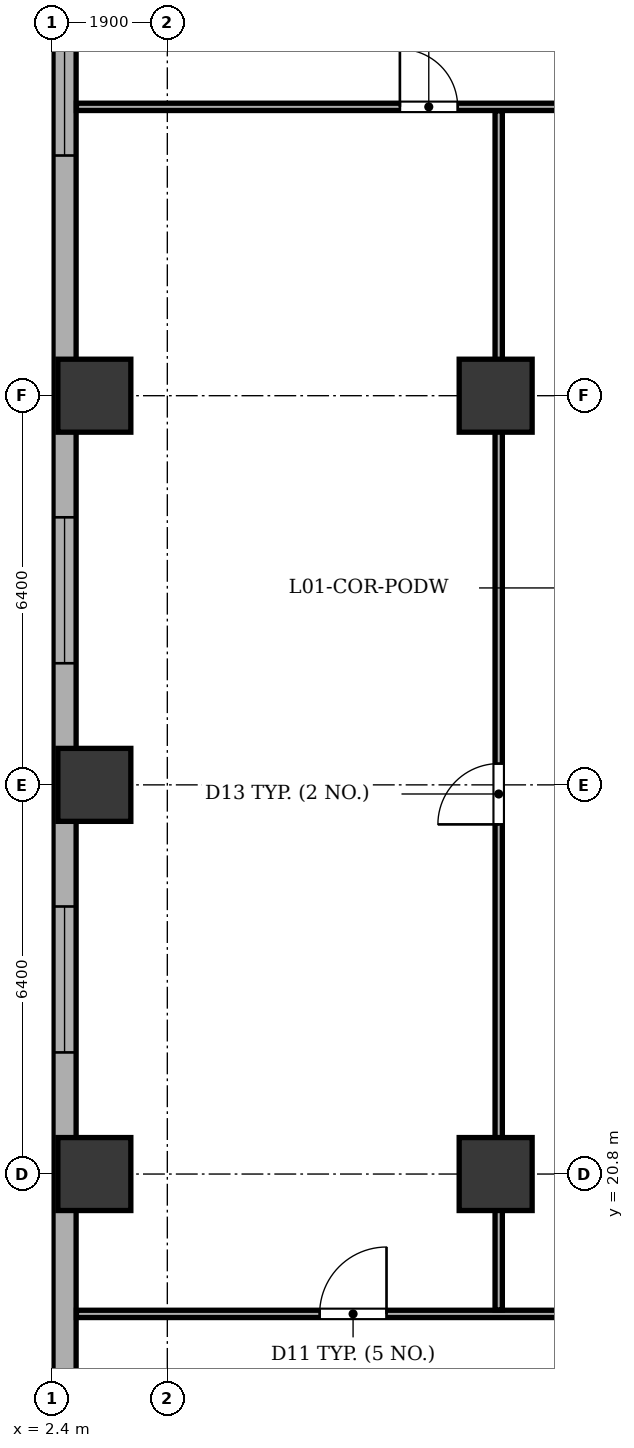
"""IFC4 building model, lengths in metres.
Left out: names, types, materials, properties, quantities, classifications, styles, units other than length and angle.
Written with IfcOpenShell. Run it as: python <this file> out.ifc"""

import sys

from ifc_helpers import new_model, si_unit, direction, frame, frame_2d, origin, origin_2d, place, context, subcontext, project, spatial, rectangle, extrude, element, fill, save


model = new_model("IFC4")
c1 = context("Model", 3, precision=1e-05, world=origin(), true_north=direction((0.0, 1.0)))
c2 = subcontext(c1, "Body", "Model", "MODEL_VIEW")
j1 = project(units=[si_unit("LENGTHUNIT", "METRE"), si_unit("PLANEANGLEUNIT", "RADIAN")], contexts=[c1])
p1 = place(None, origin())
s1 = spatial("IfcSite", under=j1, at=p1, CompositionType="ELEMENT")
p2 = place(p1, origin())
s2 = spatial("IfcBuilding", under=s1, at=p2, CompositionType="ELEMENT")
p3 = place(p2, frame((0.0, 0.0, 5.4)))
s3 = spatial("IfcBuildingStorey", under=s2, at=p3, CompositionType="ELEMENT", Elevation=5.4)
for number, where, z_axis, x_axis in (
    (1, (3.1, 20.8, 0.0), (0.0, 0.0, 1.0), (1.0, 0.0, 0.0)),
    (2, (3.1, 27.2, 0.0), (0.0, 0.0, 1.0), (1.0, 0.0, 0.0)),
    (3, (3.1, 33.6, 0.0), (0.0, 0.0, 1.0), (1.0, 0.0, 0.0)),
    (4, (9.7, 20.8, 0.0), (0.0, 0.0, 1.0), (1.0, 0.0, 0.0)),
    (5, (9.7, 33.6, 0.0), (0.0, 0.0, 1.0), (1.0, 0.0, 0.0)),
):
    element("IfcColumn", number, at=place(p3, frame(where, z_axis=z_axis, x_axis=x_axis)), inside=s3, PredefinedType="COLUMN", context=c2, shape_type="SweptSolid", body=[
        extrude(rectangle(XDim=1.2, YDim=1.2, at=origin_2d()), origin(), (0.0, 0.0, 1.0), 4.5),
    ])
p4 = place(p3, frame((2.61, 4.5, 0.0), z_axis=(0.0, 0.0, 1.0), x_axis=(0.0, 1.0, 0.0)))
e6 = element("IfcWall", 6, at=p4, inside=s3, PredefinedType="STANDARD", context=c2, shape_type="SweptSolid", body=[
    extrude(rectangle(XDim=45.4, YDim=0.38, at=frame_2d((22.7, 0.0))), origin(), (0.0, 0.0, 1.0), 4.18),
])
p5 = place(p4, frame((1.275, 0.0, 0.75)))
e7 = element("IfcOpeningElement", 7, at=p5, cuts=e6, PredefinedType="OPENING", context=c2, shape_type="SweptSolid", body=[
    extrude(rectangle(XDim=2.4, YDim=2.1, at=frame_2d((1.2, 1.05))), frame((0.0, 0.2, 0.0), z_axis=(0.0, -1.0, 0.0), x_axis=(1.0, 0.0, 0.0)), (0.0, 0.0, 1.0), 0.4),
])
p6 = place(p4, frame((9.95, 0.0, 0.75)))
e8 = element("IfcOpeningElement", 8, at=p6, cuts=e6, PredefinedType="OPENING", context=c2, shape_type="SweptSolid", body=[
    extrude(rectangle(XDim=2.4, YDim=2.1, at=frame_2d((1.2, 1.05))), frame((0.0, 0.2, 0.0), z_axis=(0.0, -1.0, 0.0), x_axis=(1.0, 0.0, 0.0)), (0.0, 0.0, 1.0), 0.4),
])
p7 = place(p4, frame((18.3, 0.0, 0.75)))
e9 = element("IfcOpeningElement", 9, at=p7, cuts=e6, PredefinedType="OPENING", context=c2, shape_type="SweptSolid", body=[
    extrude(rectangle(XDim=2.4, YDim=2.1, at=frame_2d((1.2, 1.05))), frame((0.0, 0.2, 0.0), z_axis=(0.0, -1.0, 0.0), x_axis=(1.0, 0.0, 0.0)), (0.0, 0.0, 1.0), 0.4),
])
p8 = place(p4, frame((24.7, 0.0, 0.75)))
e10 = element("IfcOpeningElement", 10, at=p8, cuts=e6, PredefinedType="OPENING", context=c2, shape_type="SweptSolid", body=[
    extrude(rectangle(XDim=2.4, YDim=2.1, at=frame_2d((1.2, 1.05))), frame((0.0, 0.2, 0.0), z_axis=(0.0, -1.0, 0.0), x_axis=(1.0, 0.0, 0.0)), (0.0, 0.0, 1.0), 0.4),
])
p9 = place(p4, frame((33.05, 0.0, 0.75)))
e11 = element("IfcOpeningElement", 11, at=p9, cuts=e6, PredefinedType="OPENING", context=c2, shape_type="SweptSolid", body=[
    extrude(rectangle(XDim=2.4, YDim=2.1, at=frame_2d((1.2, 1.05))), frame((0.0, 0.2, 0.0), z_axis=(0.0, -1.0, 0.0), x_axis=(1.0, 0.0, 0.0)), (0.0, 0.0, 1.0), 0.4),
])
p10 = place(p4, frame((41.725, 0.0, 0.75)))
e12 = element("IfcOpeningElement", 12, at=p10, cuts=e6, PredefinedType="OPENING", context=c2, shape_type="SweptSolid", body=[
    extrude(rectangle(XDim=2.4, YDim=2.1, at=frame_2d((1.2, 1.05))), frame((0.0, 0.2, 0.0), z_axis=(0.0, -1.0, 0.0), x_axis=(1.0, 0.0, 0.0)), (0.0, 0.0, 1.0), 0.4),
])
p11 = place(p3, frame((2.805, 18.5, 0.0), z_axis=(0.0, 0.0, 1.0), x_axis=(1.0, 0.0, 0.0)))
e13 = element("IfcWall", 13, at=p11, inside=s3, PredefinedType="PARTITIONING", context=c2, shape_type="SweptSolid", body=[
    extrude(rectangle(XDim=19.18, YDim=0.12, at=frame_2d((9.59, 0.0))), origin(), (0.0, 0.0, 1.0), 3.665),
])
p12 = place(p11, frame((4.0, 0.0, 0.0)))
e14 = element("IfcOpeningElement", 14, at=p12, cuts=e13, PredefinedType="OPENING", context=c2, shape_type="SweptSolid", body=[
    extrude(rectangle(XDim=1.1, YDim=2.15, at=frame_2d((0.55, 1.075))), frame((0.0, 0.07, 0.0), z_axis=(0.0, -1.0, 0.0), x_axis=(1.0, 0.0, 0.0)), (0.0, 0.0, 1.0), 0.14),
])
p13 = place(p11, frame((12.3, 0.0, 0.0)))
e15 = element("IfcOpeningElement", 15, at=p13, cuts=e13, PredefinedType="OPENING", context=c2, shape_type="SweptSolid", body=[
    extrude(rectangle(XDim=1.1, YDim=2.15, at=frame_2d((0.55, 1.075))), frame((0.0, 0.07, 0.0), z_axis=(0.0, -1.0, 0.0), x_axis=(1.0, 0.0, 0.0)), (0.0, 0.0, 1.0), 0.14),
])
p14 = place(p3, frame((2.805, 38.35, 0.0), z_axis=(0.0, 0.0, 1.0), x_axis=(1.0, 0.0, 0.0)))
e16 = element("IfcWall", 16, at=p14, inside=s3, PredefinedType="PARTITIONING", context=c2, shape_type="SweptSolid", body=[
    extrude(rectangle(XDim=54.79, YDim=0.12, at=frame_2d((27.395, 0.0))), origin(), (0.0, 0.0, 1.0), 4.18),
])
p15 = place(p14, frame((5.32, 0.0, 0.0)))
e17 = element("IfcOpeningElement", 17, at=p15, cuts=e16, PredefinedType="OPENING", context=c2, shape_type="SweptSolid", body=[
    extrude(rectangle(XDim=0.95, YDim=2.1, at=frame_2d((0.475, 1.05))), frame((0.0, 0.07, 0.0), z_axis=(0.0, -1.0, 0.0), x_axis=(1.0, 0.0, 0.0)), (0.0, 0.0, 1.0), 0.14),
])
p16 = place(p14, frame((13.87, 0.0, 0.0)))
e18 = element("IfcOpeningElement", 18, at=p16, cuts=e16, PredefinedType="OPENING", context=c2, shape_type="SweptSolid", body=[
    extrude(rectangle(XDim=0.95, YDim=2.1, at=frame_2d((0.475, 1.05))), frame((0.0, 0.07, 0.0), z_axis=(0.0, -1.0, 0.0), x_axis=(1.0, 0.0, 0.0)), (0.0, 0.0, 1.0), 0.14),
])
p17 = place(p14, frame((19.12, 0.0, 0.0)))
e19 = element("IfcOpeningElement", 19, at=p17, cuts=e16, PredefinedType="OPENING", context=c2, shape_type="SweptSolid", body=[
    extrude(rectangle(XDim=0.95, YDim=2.1, at=frame_2d((0.475, 1.05))), frame((0.0, 0.07, 0.0), z_axis=(0.0, -1.0, 0.0), x_axis=(1.0, 0.0, 0.0)), (0.0, 0.0, 1.0), 0.14),
])
p18 = place(p14, frame((23.87, 0.0, 0.0)))
e20 = element("IfcOpeningElement", 20, at=p18, cuts=e16, PredefinedType="OPENING", context=c2, shape_type="SweptSolid", body=[
    extrude(rectangle(XDim=0.95, YDim=2.1, at=frame_2d((0.475, 1.05))), frame((0.0, 0.07, 0.0), z_axis=(0.0, -1.0, 0.0), x_axis=(1.0, 0.0, 0.0)), (0.0, 0.0, 1.0), 0.14),
])
p19 = place(p14, frame((32.87, 0.0, 0.0)))
e21 = element("IfcOpeningElement", 21, at=p19, cuts=e16, PredefinedType="OPENING", context=c2, shape_type="SweptSolid", body=[
    extrude(rectangle(XDim=0.95, YDim=2.1, at=frame_2d((0.475, 1.05))), frame((0.0, 0.07, 0.0), z_axis=(0.0, -1.0, 0.0), x_axis=(1.0, 0.0, 0.0)), (0.0, 0.0, 1.0), 0.14),
])
p20 = place(p14, frame((46.37, 0.0, 0.0)))
e22 = element("IfcOpeningElement", 22, at=p20, cuts=e16, PredefinedType="OPENING", context=c2, shape_type="SweptSolid", body=[
    extrude(rectangle(XDim=0.95, YDim=2.1, at=frame_2d((0.475, 1.05))), frame((0.0, 0.07, 0.0), z_axis=(0.0, -1.0, 0.0), x_axis=(1.0, 0.0, 0.0)), (0.0, 0.0, 1.0), 0.14),
])
p21 = place(p3, frame((9.75, 18.565, 0.0), z_axis=(0.0, 0.0, 1.0), x_axis=(0.0, 1.0, 0.0)))
e23 = element("IfcWall", 23, at=p21, inside=s3, PredefinedType="PARTITIONING", context=c2, shape_type="SweptSolid", body=[
    extrude(rectangle(XDim=19.72, YDim=0.12, at=frame_2d((9.86, 0.0))), origin(), (0.0, 0.0, 1.0), 3.065),
])
p22 = place(p21, frame((7.985, 0.0, 0.0)))
e24 = element("IfcOpeningElement", 24, at=p22, cuts=e23, PredefinedType="OPENING", context=c2, shape_type="SweptSolid", body=[
    extrude(rectangle(XDim=1.0, YDim=2.1, at=frame_2d((0.5, 1.05))), frame((0.0, 0.07, 0.0), z_axis=(0.0, -1.0, 0.0), x_axis=(1.0, 0.0, 0.0)), (0.0, 0.0, 1.0), 0.14),
])
p23 = place(p7, origin())
e25 = element("IfcWindow", 25, at=p23, inside=s3, PartitioningType="SINGLE_PANEL", PredefinedType="WINDOW", context=c2, shape_type="SweptSolid", body=[
    extrude(rectangle(XDim=2.4, YDim=2.1, at=frame_2d((1.2, 1.05))), frame((0.0, 0.03, 0.0), z_axis=(0.0, -1.0, 0.0), x_axis=(1.0, 0.0, 0.0)), (0.0, 0.0, 1.0), 0.06),
])
fill(e9, e25)
p24 = place(p8, origin())
e26 = element("IfcWindow", 26, at=p24, inside=s3, PartitioningType="SINGLE_PANEL", PredefinedType="WINDOW", context=c2, shape_type="SweptSolid", body=[
    extrude(rectangle(XDim=2.4, YDim=2.1, at=frame_2d((1.2, 1.05))), frame((0.0, 0.03, 0.0), z_axis=(0.0, -1.0, 0.0), x_axis=(1.0, 0.0, 0.0)), (0.0, 0.0, 1.0), 0.06),
])
fill(e10, e26)
p25 = place(p9, origin())
e27 = element("IfcWindow", 27, at=p25, inside=s3, PartitioningType="SINGLE_PANEL", PredefinedType="WINDOW", context=c2, shape_type="SweptSolid", body=[
    extrude(rectangle(XDim=2.4, YDim=2.1, at=frame_2d((1.2, 1.05))), frame((0.0, 0.03, 0.0), z_axis=(0.0, -1.0, 0.0), x_axis=(1.0, 0.0, 0.0)), (0.0, 0.0, 1.0), 0.06),
])
fill(e11, e27)
p26 = place(p12, origin())
e28 = element("IfcDoor", 28, at=p26, inside=s3, OperationType="SINGLE_SWING_RIGHT", PredefinedType="DOOR", context=c2, shape_type="SweptSolid", body=[
    extrude(rectangle(XDim=1.1, YDim=2.15, at=frame_2d((0.55, 1.075))), frame((0.0, 0.025, 0.0), z_axis=(0.0, -1.0, 0.0), x_axis=(1.0, 0.0, 0.0)), (0.0, 0.0, 1.0), 0.05),
])
fill(e14, e28)
p27 = place(p15, origin())
e29 = element("IfcDoor", 29, at=p27, inside=s3, OperationType="SINGLE_SWING_LEFT", PredefinedType="DOOR", context=c2, shape_type="SweptSolid", body=[
    extrude(rectangle(XDim=0.95, YDim=2.1, at=frame_2d((0.475, 1.05))), frame((0.0, 0.025, 0.0), z_axis=(0.0, -1.0, 0.0), x_axis=(1.0, 0.0, 0.0)), (0.0, 0.0, 1.0), 0.05),
])
fill(e17, e29)
p28 = place(p22, origin())
e30 = element("IfcDoor", 30, at=p28, inside=s3, OperationType="SINGLE_SWING_LEFT", PredefinedType="DOOR", context=c2, shape_type="SweptSolid", body=[
    extrude(rectangle(XDim=1.0, YDim=2.1, at=frame_2d((0.5, 1.05))), frame((0.0, 0.025, 0.0), z_axis=(0.0, -1.0, 0.0), x_axis=(1.0, 0.0, 0.0)), (0.0, 0.0, 1.0), 0.05),
])
fill(e24, e30)
save(model, sys.argv[1])
